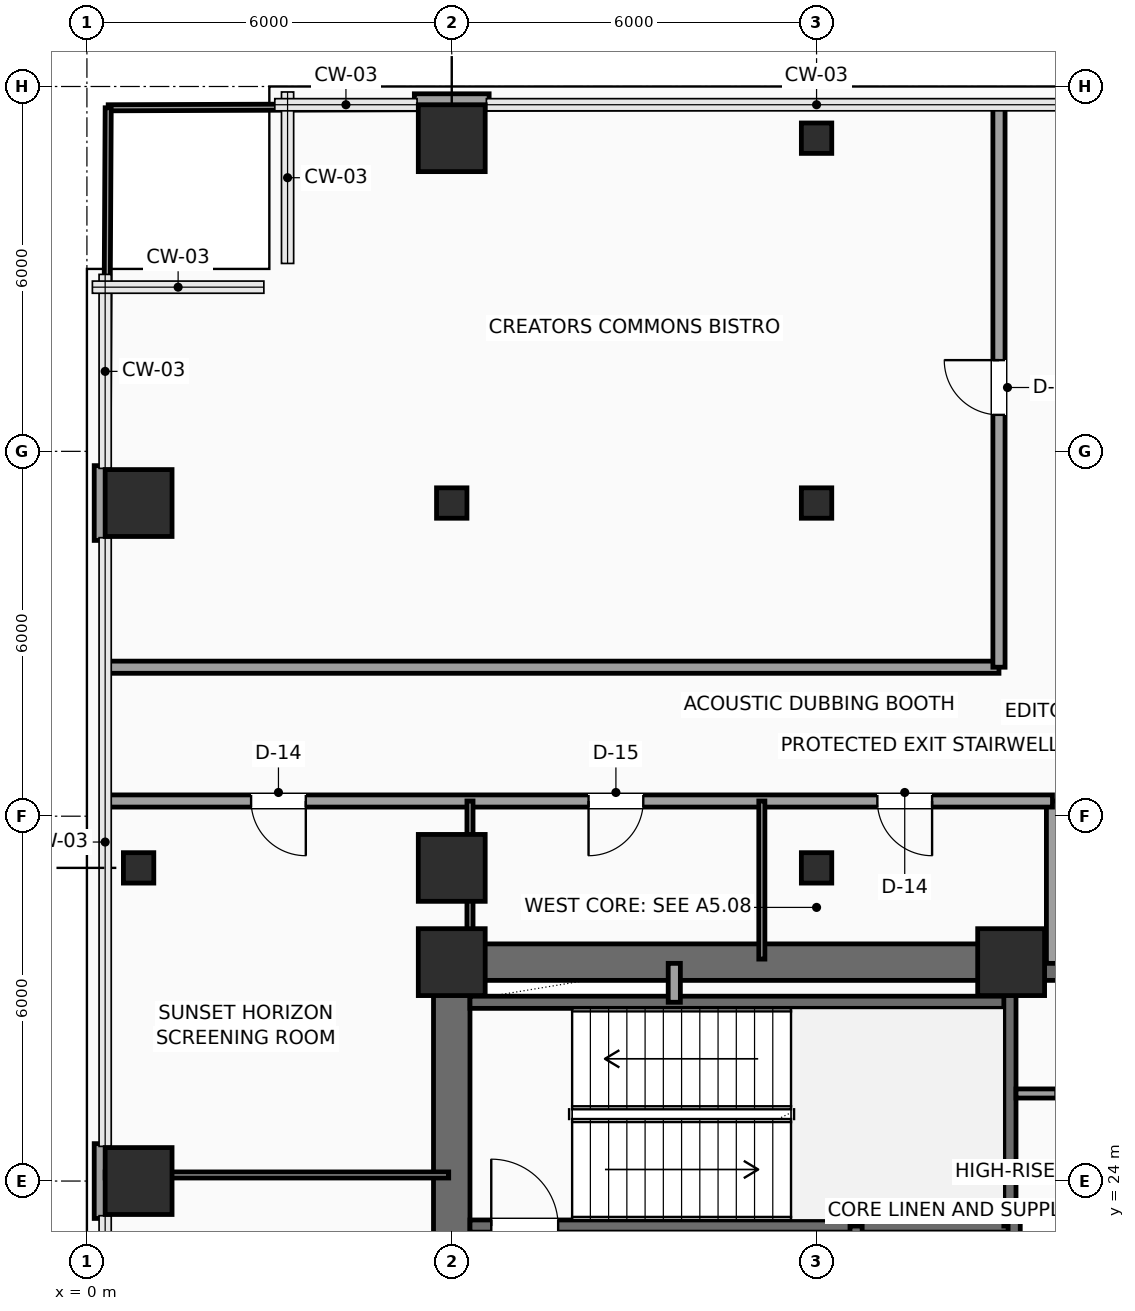
"""IFC4 building model, lengths in metres.
Left out: names, types, materials, properties, quantities, classifications, styles, units other than length and angle.
Written with IfcOpenShell. Run it as: python <this file> out.ifc"""

import sys

from ifc_helpers import new_model, si_unit, direction, frame, frame_2d, origin, origin_2d, place, context, subcontext, project, spatial, rectangle, hollow_rectangle, extrude, element, fill, save


model = new_model("IFC4")
c1 = context("Model", 3, precision=1e-05, world=origin(), true_north=direction((0.0, 1.0)))
c2 = subcontext(c1, "Body", "Model", "MODEL_VIEW")
j1 = project(units=[si_unit("LENGTHUNIT", "METRE"), si_unit("PLANEANGLEUNIT", "RADIAN")], contexts=[c1])
p1 = place(None, origin())
s1 = spatial("IfcSite", under=j1, at=p1, CompositionType="ELEMENT")
p2 = place(p1, origin())
s2 = spatial("IfcBuilding", under=s1, at=p2, CompositionType="ELEMENT")
p3 = place(p2, frame((0.0, 0.0, 141.9)))
s3 = spatial("IfcBuildingStorey", under=s2, at=p3, CompositionType="ELEMENT", Elevation=141.9)
for number, where, z_axis, x_axis in (
    (1, (6.0, 27.6, 0.0), (0.0, 0.0, 1.0), (1.0, 0.0, 0.0)),
    (2, (15.2, 27.6, 0.0), (0.0, 0.0, 1.0), (1.0, 0.0, 0.0)),
    (3, (0.85, 24.0, 0.0), (0.0, 0.0, 1.0), (1.0, 0.0, 0.0)),
):
    element("IfcColumn", number, at=place(p3, frame(where, z_axis=z_axis, x_axis=x_axis)), inside=s3, PredefinedType="COLUMN", context=c2, shape_type="SweptSolid", body=[
        extrude(rectangle(XDim=1.1, YDim=1.1, at=origin_2d()), origin(), (0.0, 0.0, 1.0), 3.75),
    ])
p4 = place(p3, frame((0.85, 29.15, 0.0), z_axis=(0.0, 0.0, 1.0), x_axis=(1.0, 0.0, 0.0)))
e4 = element("IfcColumn", 4, at=p4, inside=s3, PredefinedType="COLUMN", context=c2, shape_type="SweptSolid", body=[
    extrude(hollow_rectangle(XDim=0.5, YDim=0.5, WallThickness=0.025, InnerFilletRadius=0.025, OuterFilletRadius=0.04, at=origin_2d()), origin(), (0.0, 0.0, 1.0), 3.75),
])
for number, where, z_axis, x_axis in (
    (5, (0.85, 35.15, 0.0), (0.0, 0.0, 1.0), (1.0, 0.0, 0.0)),
    (6, (6.0, 29.15, 0.0), (0.0, 0.0, 1.0), (1.0, 0.0, 0.0)),
):
    element("IfcColumn", number, at=place(p3, frame(where, z_axis=z_axis, x_axis=x_axis)), inside=s3, PredefinedType="COLUMN", context=c2, shape_type="SweptSolid", body=[
        extrude(rectangle(XDim=1.1, YDim=1.1, at=origin_2d()), origin(), (0.0, 0.0, 1.0), 3.75),
    ])
p5 = place(p3, frame((6.0, 35.15, 0.0), z_axis=(0.0, 0.0, 1.0), x_axis=(1.0, 0.0, 0.0)))
e7 = element("IfcColumn", 7, at=p5, inside=s3, PredefinedType="COLUMN", context=c2, shape_type="SweptSolid", body=[
    extrude(hollow_rectangle(XDim=0.5, YDim=0.5, WallThickness=0.025, InnerFilletRadius=0.025, OuterFilletRadius=0.04, at=origin_2d()), origin(), (0.0, 0.0, 1.0), 3.75),
])
p6 = place(p3, frame((6.0, 41.15, 0.0), z_axis=(0.0, 0.0, 1.0), x_axis=(1.0, 0.0, 0.0)))
e8 = element("IfcColumn", 8, at=p6, inside=s3, PredefinedType="COLUMN", context=c2, shape_type="SweptSolid", body=[
    extrude(rectangle(XDim=1.1, YDim=1.1, at=origin_2d()), origin(), (0.0, 0.0, 1.0), 3.75),
])
for number, where, z_axis, x_axis in (
    (9, (12.0, 29.15, 0.0), (0.0, 0.0, 1.0), (1.0, 0.0, 0.0)),
    (10, (12.0, 35.15, 0.0), (0.0, 0.0, 1.0), (1.0, 0.0, 0.0)),
    (11, (12.0, 41.15, 0.0), (0.0, 0.0, 1.0), (1.0, 0.0, 0.0)),
):
    element("IfcColumn", number, at=place(p3, frame(where, z_axis=z_axis, x_axis=x_axis)), inside=s3, PredefinedType="COLUMN", context=c2, shape_type="SweptSolid", body=[
        extrude(hollow_rectangle(XDim=0.5, YDim=0.5, WallThickness=0.025, InnerFilletRadius=0.025, OuterFilletRadius=0.04, at=origin_2d()), origin(), (0.0, 0.0, 1.0), 3.75),
    ])
for number, where, z_axis, x_axis in (
    (12, (0.24, 23.385, 0.0), (0.0, 0.0, 1.0), (0.0, 1.0, 0.0)),
    (13, (0.24, 34.535, 0.0), (0.0, 0.0, 1.0), (0.0, 1.0, 0.0)),
    (14, (5.385, 41.76, 0.0), (0.0, 0.0, 1.0), (1.0, 0.0, 0.0)),
):
    element("IfcWall", number, at=place(p3, frame(where, z_axis=z_axis, x_axis=x_axis)), inside=s3, PredefinedType="SOLIDWALL", context=c2, shape_type="SweptSolid", body=[
        extrude(rectangle(XDim=1.23, YDim=0.24, at=frame_2d((0.615, 0.0))), origin(), (0.0, 0.0, 1.0), 3.525),
    ])
p7 = place(p3, frame((6.0, 27.6, 0.0), z_axis=(0.0, 0.0, 1.0), x_axis=(1.0, 0.0, 0.0)))
e15 = element("IfcWall", 15, at=p7, inside=s3, PredefinedType="SHEAR", context=c2, shape_type="SweptSolid", body=[
    extrude(rectangle(XDim=12.0, YDim=0.6, at=frame_2d((6.0, 0.0))), origin(), (0.0, 0.0, 1.0), 3.525),
])
p8 = place(p7, frame((10.2, 0.0, 0.0)))
e16 = element("IfcOpeningElement", 16, at=p8, cuts=e15, PredefinedType="OPENING", context=c2, shape_type="SweptSolid", body=[
    extrude(rectangle(XDim=0.9, YDim=2.15, at=frame_2d((0.45, 1.075))), frame((0.0, 0.31, 0.0), z_axis=(0.0, -1.0, 0.0), x_axis=(1.0, 0.0, 0.0)), (0.0, 0.0, 1.0), 0.62),
])
p9 = place(p3, frame((6.0, 18.0, 0.0), z_axis=(0.0, 0.0, 1.0), x_axis=(0.0, 1.0, 0.0)))
e17 = element("IfcWall", 17, at=p9, inside=s3, PredefinedType="SHEAR", context=c2, shape_type="SweptSolid", body=[
    extrude(rectangle(XDim=9.6, YDim=0.6, at=frame_2d((4.8, 0.0))), origin(), (0.0, 0.0, 1.0), 3.525),
])
p10 = place(p3, frame((6.3, 23.26, 0.0), z_axis=(0.0, 0.0, 1.0), x_axis=(1.0, 0.0, 0.0)))
e18 = element("IfcWall", 18, at=p10, inside=s3, PredefinedType="SHEAR", context=c2, shape_type="SweptSolid", body=[
    extrude(rectangle(XDim=8.88, YDim=0.2, at=frame_2d((4.44, 0.0))), origin(), (0.0, 0.0, 1.0), 3.525),
])
p11 = place(p10, frame((0.35, 0.0, 0.0)))
e19 = element("IfcOpeningElement", 19, at=p11, cuts=e18, PredefinedType="OPENING", context=c2, shape_type="SweptSolid", body=[
    extrude(rectangle(XDim=1.1, YDim=2.2, at=frame_2d((0.55, 1.1))), frame((0.0, 0.11, 0.0), z_axis=(0.0, -1.0, 0.0), x_axis=(1.0, 0.0, 0.0)), (0.0, 0.0, 1.0), 0.22),
])
p12 = place(p3, frame((6.3, 26.94, 0.0), z_axis=(0.0, 0.0, 1.0), x_axis=(1.0, 0.0, 0.0)))
e20 = element("IfcWall", 20, at=p12, inside=s3, PredefinedType="SHEAR", context=c2, shape_type="SweptSolid", body=[
    extrude(rectangle(XDim=8.88, YDim=0.2, at=frame_2d((4.44, 0.0))), origin(), (0.0, 0.0, 1.0), 3.525),
])
p13 = place(p3, frame((15.18, 23.26, 0.0), z_axis=(0.0, 0.0, 1.0), x_axis=(0.0, 1.0, 0.0)))
e21 = element("IfcWall", 21, at=p13, inside=s3, PredefinedType="SHEAR", context=c2, shape_type="SweptSolid", body=[
    extrude(rectangle(XDim=4.04, YDim=0.2, at=frame_2d((2.02, 0.0))), origin(), (0.0, 0.0, 1.0), 3.525),
])
p14 = place(p3, frame((12.65, 20.42, 0.0), z_axis=(0.0, 0.0, 1.0), x_axis=(0.0, 1.0, 0.0)))
e22 = element("IfcWall", 22, at=p14, inside=s3, PredefinedType="SHEAR", context=c2, shape_type="SweptSolid", body=[
    extrude(rectangle(XDim=2.84, YDim=0.2, at=frame_2d((1.42, 0.0))), origin(), (0.0, 0.0, 1.0), 3.525),
])
p15 = place(p14, frame((0.9, 0.0, 0.0)))
e23 = element("IfcOpeningElement", 23, at=p15, cuts=e22, PredefinedType="OPENING", context=c2, shape_type="SweptSolid", body=[
    extrude(rectangle(XDim=0.9, YDim=2.15, at=frame_2d((0.45, 1.075))), frame((0.0, 0.11, 0.0), z_axis=(0.0, -1.0, 0.0), x_axis=(1.0, 0.0, 0.0)), (0.0, 0.0, 1.0), 0.22),
])
p16 = place(p3, frame((9.66, 26.94, 0.0), z_axis=(0.0, 0.0, 1.0), x_axis=(0.0, 1.0, 0.0)))
e24 = element("IfcWall", 24, at=p16, inside=s3, PredefinedType="SOLIDWALL", context=c2, shape_type="SweptSolid", body=[
    extrude(rectangle(XDim=0.64, YDim=0.2, at=frame_2d((0.32, 0.0))), origin(), (0.0, 0.0, 1.0), 3.525),
])
p17 = place(p3, frame((15.25, 18.25, 0.0), z_axis=(0.0, 0.0, 1.0), x_axis=(0.0, 1.0, 0.0)))
e25 = element("IfcWall", 25, at=p17, inside=s3, PredefinedType="SHEAR", context=c2, shape_type="SweptSolid", body=[
    extrude(rectangle(XDim=5.2, YDim=0.2, at=frame_2d((2.6, 0.0))), origin(), (0.0, 0.0, 1.0), 3.525),
])
p18 = place(p3, frame((15.25, 23.45, 0.0), z_axis=(0.0, 0.0, 1.0), x_axis=(1.0, 0.0, 0.0)))
e26 = element("IfcWall", 26, at=p18, inside=s3, PredefinedType="SHEAR", context=c2, shape_type="SweptSolid", body=[
    extrude(rectangle(XDim=2.45, YDim=0.2, at=frame_2d((1.225, 0.0))), origin(), (0.0, 0.0, 1.0), 3.525),
])
p19 = place(p3, frame((15.28, 25.44, 0.0), z_axis=(0.0, 0.0, 1.0), x_axis=(1.0, 0.0, 0.0)))
e27 = element("IfcWall", 27, at=p19, inside=s3, PredefinedType="PARTITIONING", context=c2, shape_type="SweptSolid", body=[
    extrude(rectangle(XDim=2.42, YDim=0.15, at=frame_2d((1.21, 0.0))), origin(), (0.0, 0.0, 1.0), 3.525),
])
p20 = place(p19, frame((0.65, 0.0, 0.0)))
e28 = element("IfcOpeningElement", 28, at=p20, cuts=e27, PredefinedType="OPENING", context=c2, shape_type="SweptSolid", body=[
    extrude(rectangle(XDim=0.9, YDim=2.15, at=frame_2d((0.45, 1.075))), frame((0.0, 0.085, 0.0), z_axis=(0.0, -1.0, 0.0), x_axis=(1.0, 0.0, 0.0)), (0.0, 0.0, 1.0), 0.17),
])
p21 = place(p3, frame((15.88, 27.58, 0.0), z_axis=(0.0, 0.0, 1.0), x_axis=(0.0, 1.0, 0.0)))
e29 = element("IfcWall", 29, at=p21, inside=s3, PredefinedType="PARTITIONING", context=c2, shape_type="SweptSolid", body=[
    extrude(rectangle(XDim=2.67, YDim=0.2, at=frame_2d((1.335, 0.0))), origin(), (0.0, 0.0, 1.0), 3.525),
])
p22 = place(p3, frame((15.88, 30.25, 0.0), z_axis=(0.0, 0.0, 1.0), x_axis=(-1.0, 0.0, 0.0)))
e30 = element("IfcWall", 30, at=p22, inside=s3, PredefinedType="PARTITIONING", context=c2, shape_type="SweptSolid", body=[
    extrude(rectangle(XDim=15.58, YDim=0.2, at=frame_2d((7.79, 0.0))), origin(), (0.0, 0.0, 1.0), 3.525),
])
p23 = place(p22, frame((12.28, 0.0, 0.0)))
e31 = element("IfcOpeningElement", 31, at=p23, cuts=e30, PredefinedType="OPENING", context=c2, shape_type="SweptSolid", body=[
    extrude(rectangle(XDim=0.9, YDim=2.1, at=frame_2d((0.45, 1.05))), frame((0.0, 0.11, 0.0), z_axis=(0.0, -1.0, 0.0), x_axis=(1.0, 0.0, 0.0)), (0.0, 0.0, 1.0), 0.22),
])
p24 = place(p22, frame((6.73, 0.0, 0.0)))
e32 = element("IfcOpeningElement", 32, at=p24, cuts=e30, PredefinedType="OPENING", context=c2, shape_type="SweptSolid", body=[
    extrude(rectangle(XDim=0.9, YDim=2.1, at=frame_2d((0.45, 1.05))), frame((0.0, 0.11, 0.0), z_axis=(0.0, -1.0, 0.0), x_axis=(1.0, 0.0, 0.0)), (0.0, 0.0, 1.0), 0.22),
])
p25 = place(p22, frame((1.98, 0.0, 0.0)))
e33 = element("IfcOpeningElement", 33, at=p25, cuts=e30, PredefinedType="OPENING", context=c2, shape_type="SweptSolid", body=[
    extrude(rectangle(XDim=0.9, YDim=2.1, at=frame_2d((0.45, 1.05))), frame((0.0, 0.11, 0.0), z_axis=(0.0, -1.0, 0.0), x_axis=(1.0, 0.0, 0.0)), (0.0, 0.0, 1.0), 0.22),
])
p26 = place(p3, frame((0.3, 32.45, 0.0), z_axis=(0.0, 0.0, 1.0), x_axis=(1.0, 0.0, 0.0)))
e34 = element("IfcWall", 34, at=p26, inside=s3, PredefinedType="PARTITIONING", context=c2, shape_type="SweptSolid", body=[
    extrude(rectangle(XDim=14.7, YDim=0.2, at=frame_2d((7.35, 0.0))), origin(), (0.0, 0.0, 1.0), 3.525),
])
p27 = place(p3, frame((15.0, 32.45, 0.0), z_axis=(0.0, 0.0, 1.0), x_axis=(0.0, 1.0, 0.0)))
e35 = element("IfcWall", 35, at=p27, inside=s3, PredefinedType="PARTITIONING", context=c2, shape_type="SweptSolid", body=[
    extrude(rectangle(XDim=9.25, YDim=0.2, at=frame_2d((4.625, 0.0))), origin(), (0.0, 0.0, 1.0), 3.525),
])
p28 = place(p27, frame((4.15, 0.0, 0.0)))
e36 = element("IfcOpeningElement", 36, at=p28, cuts=e35, PredefinedType="OPENING", context=c2, shape_type="SweptSolid", body=[
    extrude(rectangle(XDim=0.9, YDim=2.1, at=frame_2d((0.45, 1.05))), frame((0.0, 0.11, 0.0), z_axis=(0.0, -1.0, 0.0), x_axis=(1.0, 0.0, 0.0)), (0.0, 0.0, 1.0), 0.22),
])
p29 = place(p3, frame((0.3, 24.1, 0.0), z_axis=(0.0, 0.0, 1.0), x_axis=(1.0, 0.0, 0.0)))
e37 = element("IfcWall", 37, at=p29, inside=s3, PredefinedType="PARTITIONING", context=c2, shape_type="SweptSolid", body=[
    extrude(rectangle(XDim=5.65, YDim=0.1, at=frame_2d((2.825, 0.0))), origin(), (0.0, 0.0, 1.0), 3.525),
])
for number, where, z_axis, x_axis in (
    (38, (6.3, 27.65, 0.0), (0.0, 0.0, 1.0), (0.0, 1.0, 0.0)),
    (39, (11.1, 27.65, 0.0), (0.0, 0.0, 1.0), (0.0, 1.0, 0.0)),
):
    element("IfcWall", number, at=place(p3, frame(where, z_axis=z_axis, x_axis=x_axis)), inside=s3, PredefinedType="PARTITIONING", context=c2, shape_type="SweptSolid", body=[
        extrude(rectangle(XDim=2.6, YDim=0.1, at=frame_2d((1.3, 0.0))), origin(), (0.0, 0.0, 1.0), 3.525),
    ])
p30 = place(p3, frame((0.35, 41.65, 0.0), z_axis=(0.0, 0.0, 1.0), x_axis=(0.999994073761, 0.003442737683, 0.0)))
e40 = element("IfcWall", 40, at=p30, inside=s3, PredefinedType="PARTITIONING", context=c2, shape_type="SweptSolid", body=[
    extrude(rectangle(XDim=5.035, YDim=0.1, at=frame_2d((2.518, 0.0))), origin(), (0.0, 0.0, 1.0), 3.525),
])
p31 = place(p3, frame((6.615, 41.671, 0.0), z_axis=(0.0, 0.0, 1.0), x_axis=(0.999994197557, 0.003406589638, 0.0)))
e41 = element("IfcWall", 41, at=p31, inside=s3, PredefinedType="PARTITIONING", context=c2, shape_type="SweptSolid", body=[
    extrude(rectangle(XDim=8.385, YDim=0.1, at=frame_2d((4.192, 0.0))), origin(), (0.0, 0.0, 1.0), 3.525),
])
p32 = place(p3, frame((0.3, 32.45, 0.0), z_axis=(0.0, 0.0, 1.0), x_axis=(0.005386338724, 0.999985493572, 0.0)))
e42 = element("IfcWall", 42, at=p32, inside=s3, PredefinedType="PARTITIONING", context=c2, shape_type="SweptSolid", body=[
    extrude(rectangle(XDim=2.085, YDim=0.1, at=frame_2d((1.042, 0.0))), origin(), (0.0, 0.0, 1.0), 3.525),
])
p33 = place(p3, frame((0.318, 35.765, 0.0), z_axis=(0.0, 0.0, 1.0), x_axis=(0.005434476894, 0.999985233121, 0.0)))
e43 = element("IfcWall", 43, at=p33, inside=s3, PredefinedType="PARTITIONING", context=c2, shape_type="SweptSolid", body=[
    extrude(rectangle(XDim=5.885, YDim=0.1, at=frame_2d((2.942, 0.0))), origin(), (0.0, 0.0, 1.0), 3.525),
])
p34 = place(p11, origin())
e44 = element("IfcDoor", 44, at=p34, inside=s3, OperationType="SINGLE_SWING_LEFT", PredefinedType="DOOR", context=c2, shape_type="SweptSolid", body=[
    extrude(rectangle(XDim=1.1, YDim=2.2, at=frame_2d((0.55, 1.1))), frame((0.0, 0.025, 0.0), z_axis=(0.0, -1.0, 0.0), x_axis=(1.0, 0.0, 0.0)), (0.0, 0.0, 1.0), 0.05),
])
fill(e19, e44)
p35 = place(p23, origin())
e45 = element("IfcDoor", 45, at=p35, inside=s3, OperationType="SINGLE_SWING_LEFT", PredefinedType="DOOR", context=c2, shape_type="SweptSolid", body=[
    extrude(rectangle(XDim=0.9, YDim=2.1, at=frame_2d((0.45, 1.05))), frame((0.0, 0.025, 0.0), z_axis=(0.0, -1.0, 0.0), x_axis=(1.0, 0.0, 0.0)), (0.0, 0.0, 1.0), 0.05),
])
fill(e31, e45)
p36 = place(p24, origin())
e46 = element("IfcDoor", 46, at=p36, inside=s3, OperationType="SINGLE_SWING_RIGHT", PredefinedType="DOOR", context=c2, shape_type="SweptSolid", body=[
    extrude(rectangle(XDim=0.9, YDim=2.1, at=frame_2d((0.45, 1.05))), frame((0.0, 0.025, 0.0), z_axis=(0.0, -1.0, 0.0), x_axis=(1.0, 0.0, 0.0)), (0.0, 0.0, 1.0), 0.05),
])
fill(e32, e46)
p37 = place(p25, origin())
e47 = element("IfcDoor", 47, at=p37, inside=s3, OperationType="SINGLE_SWING_LEFT", PredefinedType="DOOR", context=c2, shape_type="SweptSolid", body=[
    extrude(rectangle(XDim=0.9, YDim=2.1, at=frame_2d((0.45, 1.05))), frame((0.0, 0.025, 0.0), z_axis=(0.0, -1.0, 0.0), x_axis=(1.0, 0.0, 0.0)), (0.0, 0.0, 1.0), 0.05),
])
fill(e33, e47)
p38 = place(p28, origin())
e48 = element("IfcDoor", 48, at=p38, inside=s3, OperationType="SINGLE_SWING_RIGHT", PredefinedType="DOOR", context=c2, shape_type="SweptSolid", body=[
    extrude(rectangle(XDim=0.9, YDim=2.1, at=frame_2d((0.45, 1.05))), frame((0.0, 0.025, 0.0), z_axis=(0.0, -1.0, 0.0), x_axis=(1.0, 0.0, 0.0)), (0.0, 0.0, 1.0), 0.05),
])
fill(e36, e48)
save(model, sys.argv[1])
